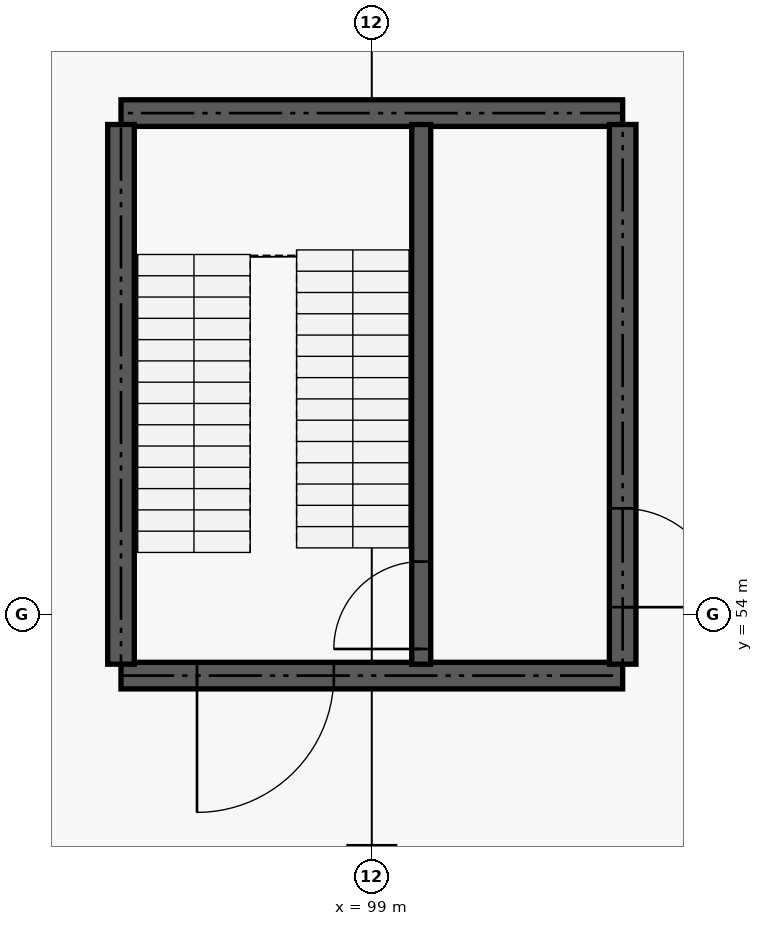
"""IFC4 building model, lengths in metres.
Left out: names, types, materials, properties, quantities, classifications, styles, units other than length and angle.
Written with IfcOpenShell. Run it as: python <this file> out.ifc"""

import sys

from ifc_helpers import new_model, si_unit, direction, frame, frame_2d, origin, origin_2d, place, context, subcontext, project, spatial, rectangle, i_section, extrude, element, fill, save


model = new_model("IFC4")
c1 = context("Model", 3, precision=1e-05, world=origin(), true_north=direction((0.0, 1.0)))
c2 = subcontext(c1, "Body", "Model", "MODEL_VIEW")
j1 = project(units=[si_unit("LENGTHUNIT", "METRE"), si_unit("PLANEANGLEUNIT", "RADIAN")], contexts=[c1])
p1 = place(None, origin())
s1 = spatial("IfcSite", under=j1, at=p1, CompositionType="ELEMENT")
p2 = place(p1, origin())
s2 = spatial("IfcBuilding", under=s1, at=p2, CompositionType="ELEMENT")
p3 = place(p2, origin())
s3 = spatial("IfcBuildingStorey", under=s2, at=p3, CompositionType="ELEMENT", Elevation=0.0)
p4 = place(p3, frame((99.0, 50.8, 0.0), z_axis=(0.0, 0.0, 1.0), x_axis=(0.0, -1.0, 0.0)))
e1 = element("IfcColumn", 1, at=p4, inside=s3, PredefinedType="COLUMN", context=c2, shape_type="SweptSolid", body=[
    extrude(i_section(OverallWidth=0.3, OverallDepth=0.6, WebThickness=0.015, FlangeThickness=0.03, FilletRadius=0.027, at=origin_2d()), origin(), (0.0, 0.0, 1.0), 5.4),
])
p5 = place(p3, frame((95.7, 53.2, 0.0), z_axis=(0.0, 0.0, 1.0), x_axis=(1.0, 0.0, 0.0)))
e2 = element("IfcWall", 2, at=p5, inside=s3, PredefinedType="SHEAR", context=c2, shape_type="SweptSolid", body=[
    extrude(rectangle(XDim=6.6, YDim=0.35, at=frame_2d((3.3, 0.0))), origin(), (0.0, 0.0, 1.0), 5.4),
])
p6 = place(p5, frame((1.0, 0.0, 0.0)))
e3 = element("IfcOpeningElement", 3, at=p6, cuts=e2, PredefinedType="OPENING", context=c2, shape_type="SweptSolid", body=[
    extrude(rectangle(XDim=1.8, YDim=2.15, at=frame_2d((0.9, 1.075))), frame((0.0, 0.185, 0.0), z_axis=(0.0, -1.0, 0.0), x_axis=(1.0, 0.0, 0.0)), (0.0, 0.0, 1.0), 0.37),
])
p7 = place(p3, frame((95.7, 60.6, 0.0), z_axis=(0.0, 0.0, 1.0), x_axis=(1.0, 0.0, 0.0)))
e4 = element("IfcWall", 4, at=p7, inside=s3, PredefinedType="SHEAR", context=c2, shape_type="SweptSolid", body=[
    extrude(rectangle(XDim=6.6, YDim=0.35, at=frame_2d((3.3, 0.0))), origin(), (0.0, 0.0, 1.0), 5.4),
])
p8 = place(p3, frame((95.7, 53.35, 0.0), z_axis=(0.0, 0.0, 1.0), x_axis=(0.0, 1.0, 0.0)))
e5 = element("IfcWall", 5, at=p8, inside=s3, PredefinedType="SHEAR", context=c2, shape_type="SweptSolid", body=[
    extrude(rectangle(XDim=7.1, YDim=0.35, at=frame_2d((3.55, 0.0))), origin(), (0.0, 0.0, 1.0), 5.4),
])
p9 = place(p3, frame((102.3, 53.35, 0.0), z_axis=(0.0, 0.0, 1.0), x_axis=(0.0, 1.0, 0.0)))
e6 = element("IfcWall", 6, at=p9, inside=s3, PredefinedType="SHEAR", context=c2, shape_type="SweptSolid", body=[
    extrude(rectangle(XDim=7.1, YDim=0.35, at=frame_2d((3.55, 0.0))), origin(), (0.0, 0.0, 1.0), 5.4),
])
p10 = place(p9, frame((0.75, 0.0, 0.0)))
e7 = element("IfcOpeningElement", 7, at=p10, cuts=e6, PredefinedType="OPENING", context=c2, shape_type="SweptSolid", body=[
    extrude(rectangle(XDim=1.3, YDim=2.15, at=frame_2d((0.65, 1.075))), frame((0.0, 0.185, 0.0), z_axis=(0.0, -1.0, 0.0), x_axis=(1.0, 0.0, 0.0)), (0.0, 0.0, 1.0), 0.37),
])
p11 = place(p3, frame((99.65, 53.35, 0.0), z_axis=(0.0, 0.0, 1.0), x_axis=(0.0, 1.0, 0.0)))
e8 = element("IfcWall", 8, at=p11, inside=s3, PredefinedType="SHEAR", context=c2, shape_type="SweptSolid", body=[
    extrude(rectangle(XDim=7.1, YDim=0.25, at=frame_2d((3.55, 0.0))), origin(), (0.0, 0.0, 1.0), 5.4),
])
p12 = place(p11, frame((0.2, 0.0, 0.0)))
e9 = element("IfcOpeningElement", 9, at=p12, cuts=e8, PredefinedType="OPENING", context=c2, shape_type="SweptSolid", body=[
    extrude(rectangle(XDim=1.15, YDim=2.15, at=frame_2d((0.575, 1.075))), frame((0.0, 0.135, 0.0), z_axis=(0.0, -1.0, 0.0), x_axis=(1.0, 0.0, 0.0)), (0.0, 0.0, 1.0), 0.27),
])
p13 = place(p10, frame((1.3, 0.0, 0.0), z_axis=(0.0, 0.0, 1.0), x_axis=(-1.0, 0.0, 0.0)))
e10 = element("IfcDoor", 10, at=p13, inside=s3, OperationType="DOUBLE_DOOR_SINGLE_SWING", PredefinedType="DOOR", context=c2, shape_type="SweptSolid", body=[
    extrude(rectangle(XDim=1.3, YDim=2.15, at=frame_2d((0.65, 1.075))), frame((0.0, 0.025, 0.0), z_axis=(0.0, -1.0, 0.0), x_axis=(1.0, 0.0, 0.0)), (0.0, 0.0, 1.0), 0.05),
])
fill(e7, e10)
p14 = place(p12, origin())
e11 = element("IfcDoor", 11, at=p14, inside=s3, OperationType="SINGLE_SWING_LEFT", PredefinedType="DOOR", context=c2, shape_type="SweptSolid", body=[
    extrude(rectangle(XDim=1.15, YDim=2.15, at=frame_2d((0.575, 1.075))), frame((0.0, 0.025, 0.0), z_axis=(0.0, -1.0, 0.0), x_axis=(1.0, 0.0, 0.0)), (0.0, 0.0, 1.0), 0.05),
])
fill(e9, e11)
p15 = place(p6, frame((1.8, 0.0, 0.0), z_axis=(0.0, 0.0, 1.0), x_axis=(-1.0, 0.0, 0.0)))
e12 = element("IfcDoor", 12, at=p15, inside=s3, OperationType="DOUBLE_DOOR_SINGLE_SWING", PredefinedType="DOOR", context=c2, shape_type="SweptSolid", body=[
    extrude(rectangle(XDim=1.8, YDim=2.15, at=frame_2d((0.9, 1.075))), frame((0.0, 0.025, 0.0), z_axis=(0.0, -1.0, 0.0), x_axis=(1.0, 0.0, 0.0)), (0.0, 0.0, 1.0), 0.05),
])
fill(e3, e12)
save(model, sys.argv[1])
